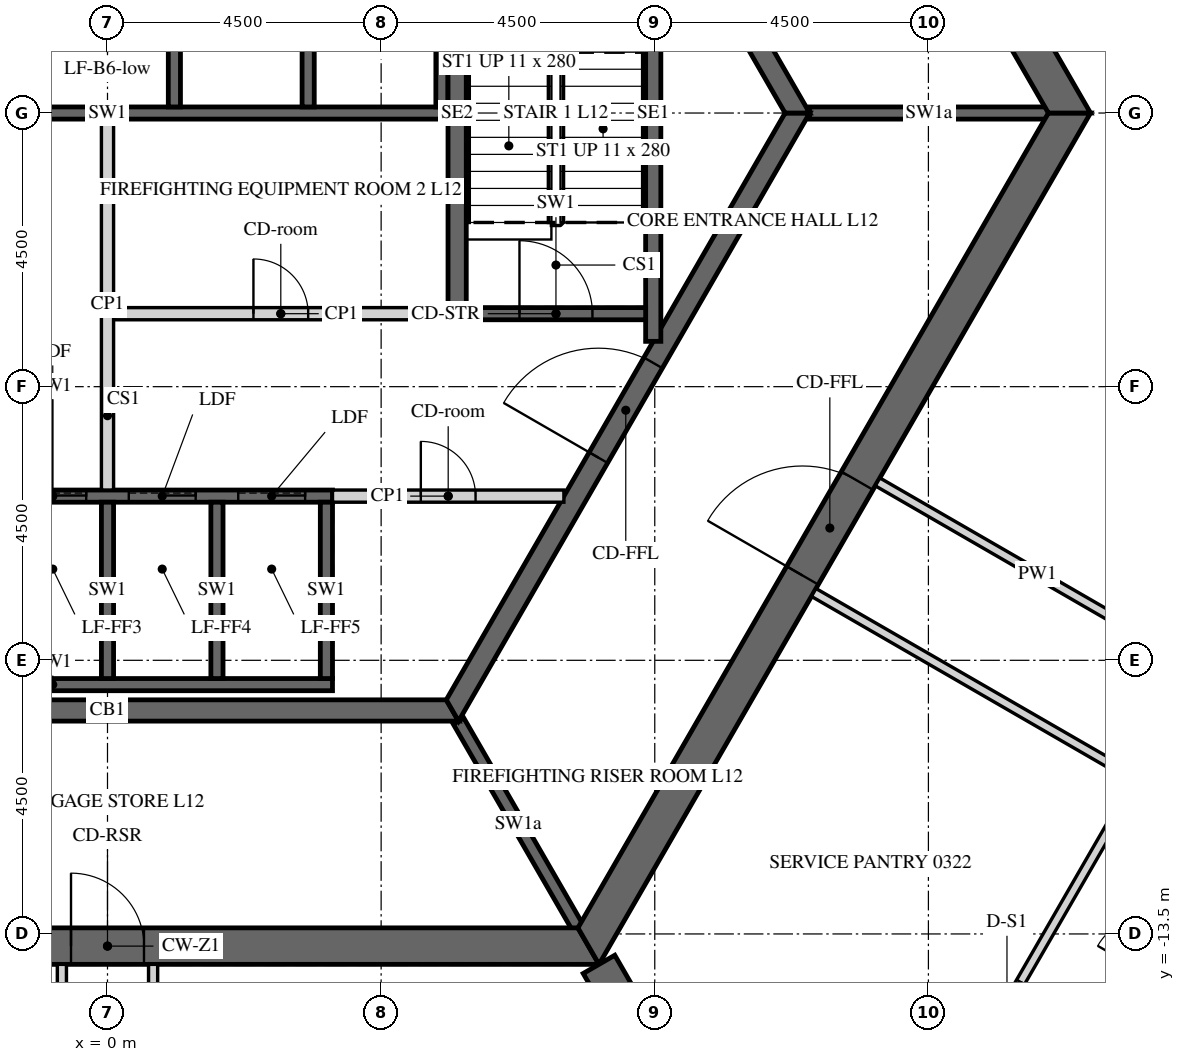
"""IFC4 building model, lengths in metres.
Left out: names, types, materials, properties, quantities, classifications, styles, units other than length and angle.
Written with IfcOpenShell. Run it as: python <this file> out.ifc"""

import sys

from ifc_helpers import new_model, si_unit, direction, frame, frame_2d, origin, place, context, subcontext, project, spatial, polyline, rectangle, outline, extrude, element, fill, save


model = new_model("IFC4")
c1 = context("Model", 3, precision=1e-05, world=origin(), true_north=direction((0.0, 1.0)))
c2 = subcontext(c1, "Body", "Model", "MODEL_VIEW")
j1 = project(units=[si_unit("LENGTHUNIT", "METRE"), si_unit("PLANEANGLEUNIT", "RADIAN")], contexts=[c1])
p1 = place(None, origin())
s1 = spatial("IfcSite", under=j1, at=p1, CompositionType="ELEMENT")
p2 = place(p1, origin())
s2 = spatial("IfcBuilding", under=s1, at=p2, CompositionType="ELEMENT")
p3 = place(p2, frame((0.0, 0.0, 60.9)))
s3 = spatial("IfcBuildingStorey", under=s2, at=p3, CompositionType="ELEMENT", Elevation=60.9)
p4 = place(p3, frame((-7.91, -13.7, -0.15), z_axis=(0.0, 0.0, 1.0), x_axis=(1.0, 0.0, 0.0)))
e1 = element("IfcWall", 1, at=p4, inside=s3, PredefinedType="SHEAR", context=c2, shape_type="SweptSolid", body=[
    extrude(outline(polyline([(-0.173, -0.3), (15.993, -0.3), (15.646, 0.3), (0.173, 0.3), (-0.173, -0.3)])), origin(), (0.0, 0.0, 1.0), 3.9),
])
p5 = place(p4, frame((7.31, 0.0, 0.15)))
e2 = element("IfcOpeningElement", 2, at=p5, cuts=e1, PredefinedType="OPENING", context=c2, shape_type="SweptSolid", body=[
    extrude(rectangle(XDim=1.2, YDim=2.4, at=frame_2d((0.6, 1.2))), frame((0.0, 0.31, 0.0), z_axis=(0.0, -1.0, 0.0), x_axis=(1.0, 0.0, 0.0)), (0.0, 0.0, 1.0), 0.62),
])
p6 = place(p3, frame((7.91, -13.7, -0.15), z_axis=(0.0, 0.0, 1.0), x_axis=(0.499999880136, 0.866025472988, 0.0)))
e3 = element("IfcWall", 3, at=p6, inside=s3, PredefinedType="SHEAR", context=c2, shape_type="SweptSolid", body=[
    extrude(outline(polyline([(-0.173, -0.3), (15.993, -0.3), (15.646, 0.3), (0.173, 0.3), (-0.173, -0.3)])), origin(), (0.0, 0.0, 1.0), 3.9),
])
p7 = place(p6, frame((7.039, 0.0, 0.15)))
e4 = element("IfcOpeningElement", 4, at=p7, cuts=e3, PredefinedType="OPENING", context=c2, shape_type="SweptSolid", body=[
    extrude(rectangle(XDim=1.8, YDim=2.4, at=frame_2d((0.9, 1.2))), frame((0.0, 0.31, 0.0), z_axis=(0.0, -1.0, 0.0), x_axis=(1.0, 0.0, 0.0)), (0.0, 0.0, 1.0), 0.62),
])
p8 = place(p3, frame((15.819, 0.0, -0.15), z_axis=(0.0, 0.0, 1.0), x_axis=(-0.499999880136, 0.866025472988, 0.0)))
e5 = element("IfcWall", 5, at=p8, inside=s3, PredefinedType="SHEAR", context=c2, shape_type="SweptSolid", body=[
    extrude(outline(polyline([(-0.173, -0.3), (15.993, -0.3), (15.646, 0.3), (0.173, 0.3), (-0.173, -0.3)])), origin(), (0.0, 0.0, 1.0), 3.9),
])
p9 = place(p8, frame((6.981, 0.0, 0.15)))
e6 = element("IfcOpeningElement", 6, at=p9, cuts=e5, PredefinedType="OPENING", context=c2, shape_type="SweptSolid", body=[
    extrude(rectangle(XDim=1.8, YDim=2.4, at=frame_2d((0.9, 1.2))), frame((0.0, 0.31, 0.0), z_axis=(0.0, -1.0, 0.0), x_axis=(1.0, 0.0, 0.0)), (0.0, 0.0, 1.0), 0.62),
])
p10 = place(p3, frame((8.083, -14.0, -0.15), z_axis=(0.0, 0.0, 1.0), x_axis=(0.499997680643, -0.866026742862, 0.0)))
e7 = element("IfcWall", 7, at=p10, inside=s3, PredefinedType="SHEAR", context=c2, shape_type="SweptSolid", body=[
    extrude(rectangle(XDim=16.509, YDim=0.6, at=frame_2d((8.254, 0.0))), origin(), (0.0, 0.0, 1.0), 3.9),
])
p11 = place(p10, frame((7.354, 0.0, 0.15)))
e8 = element("IfcOpeningElement", 8, at=p11, cuts=e7, PredefinedType="OPENING", context=c2, shape_type="SweptSolid", body=[
    extrude(rectangle(XDim=1.8, YDim=2.4, at=frame_2d((0.9, 1.2))), frame((0.0, 0.31, 0.0), z_axis=(0.0, -1.0, 0.0), x_axis=(1.0, 0.0, 0.0)), (0.0, 0.0, 1.0), 0.62),
])
p12 = place(p3, frame((-5.673, -9.825, -0.15), z_axis=(0.0, 0.0, 1.0), x_axis=(1.0, 0.0, 0.0)))
e9 = element("IfcWall", 9, at=p12, inside=s3, PredefinedType="SHEAR", context=c2, shape_type="SweptSolid", body=[
    extrude(outline(polyline([(-0.101, -0.175), (11.446, -0.175), (11.244, 0.175), (0.101, 0.175), (-0.101, -0.175)])), origin(), (0.0, 0.0, 1.0), 3.9),
])
p13 = place(p3, frame((5.673, -9.825, -0.15), z_axis=(0.0, 0.0, 1.0), x_axis=(0.499995046907, 0.866028263435, 0.0)))
e10 = element("IfcWall", 10, at=p13, inside=s3, PredefinedType="SHEAR", context=c2, shape_type="SweptSolid", body=[
    extrude(outline(polyline([(-0.101, -0.175), (11.446, -0.175), (11.244, 0.175), (0.101, 0.175), (-0.101, -0.175)])), origin(), (0.0, 0.0, 1.0), 3.9),
])
p14 = place(p13, frame((4.801, 0.0, 0.15)))
e11 = element("IfcOpeningElement", 11, at=p14, cuts=e10, PredefinedType="OPENING", context=c2, shape_type="SweptSolid", body=[
    extrude(rectangle(XDim=1.8, YDim=2.4, at=frame_2d((0.9, 1.2))), frame((0.0, 0.185, 0.0), z_axis=(0.0, -1.0, 0.0), x_axis=(1.0, 0.0, 0.0)), (0.0, 0.0, 1.0), 0.37),
])
p15 = place(p3, frame((11.345, 0.0, -0.15), z_axis=(0.0, 0.0, 1.0), x_axis=(-0.499995046907, 0.866028263435, 0.0)))
e12 = element("IfcWall", 12, at=p15, inside=s3, PredefinedType="SHEAR", context=c2, shape_type="SweptSolid", body=[
    extrude(outline(polyline([(-0.101, -0.175), (11.446, -0.175), (11.244, 0.175), (0.101, 0.175), (-0.101, -0.175)])), origin(), (0.0, 0.0, 1.0), 3.9),
])
p16 = place(p15, frame((4.744, 0.0, 0.15)))
e13 = element("IfcOpeningElement", 13, at=p16, cuts=e12, PredefinedType="OPENING", context=c2, shape_type="SweptSolid", body=[
    extrude(rectangle(XDim=1.8, YDim=2.4, at=frame_2d((0.9, 1.2))), frame((0.0, 0.185, 0.0), z_axis=(0.0, -1.0, 0.0), x_axis=(1.0, 0.0, 0.0)), (0.0, 0.0, 1.0), 0.37),
])
p17 = place(p3, frame((-5.6, 0.0, -0.25), z_axis=(0.0, 0.0, 1.0), x_axis=(1.0, 0.0, 0.0)))
e14 = element("IfcWall", 14, at=p17, inside=s3, PredefinedType="SHEAR", context=c2, shape_type="SweptSolid", body=[
    extrude(rectangle(XDim=11.2, YDim=0.2, at=frame_2d((5.6, 0.0))), origin(), (0.0, 0.0, 1.0), 3.9),
])
for number, where, z_axis, x_axis in (
    (15, (1.1, 0.1, -0.25), (0.0, 0.0, 1.0), (0.0, 1.0, 0.0)),
    (16, (3.3, 0.1, -0.25), (0.0, 0.0, 1.0), (0.0, 1.0, 0.0)),
    (17, (5.5, 0.1, -0.25), (0.0, 0.0, 1.0), (0.0, 1.0, 0.0)),
):
    element("IfcWall", number, at=place(p3, frame(where, z_axis=z_axis, x_axis=x_axis)), inside=s3, PredefinedType="SHEAR", context=c2, shape_type="SweptSolid", body=[
        extrude(rectangle(XDim=3.1, YDim=0.2, at=frame_2d((1.55, 0.0))), origin(), (0.0, 0.0, 1.0), 3.9),
    ])
p18 = place(p3, frame((-5.5, -6.3, -0.25), z_axis=(0.0, 0.0, 1.0), x_axis=(1.0, 0.0, 0.0)))
e18 = element("IfcWall", 18, at=p18, inside=s3, PredefinedType="SHEAR", context=c2, shape_type="SweptSolid", body=[
    extrude(rectangle(XDim=9.2, YDim=0.2, at=frame_2d((4.6, 0.0))), origin(), (0.0, 0.0, 1.0), 3.9),
])
p19 = place(p18, frame((0.45, 0.0, 0.25)))
e19 = element("IfcOpeningElement", 19, at=p19, cuts=e18, PredefinedType="OPENING", context=c2, shape_type="SweptSolid", body=[
    extrude(rectangle(XDim=1.1, YDim=2.1, at=frame_2d((0.55, 1.05))), frame((0.0, 0.11, 0.0), z_axis=(0.0, -1.0, 0.0), x_axis=(1.0, 0.0, 0.0)), (0.0, 0.0, 1.0), 0.22),
])
p20 = place(p18, frame((2.25, 0.0, 0.25)))
e20 = element("IfcOpeningElement", 20, at=p20, cuts=e18, PredefinedType="OPENING", context=c2, shape_type="SweptSolid", body=[
    extrude(rectangle(XDim=1.1, YDim=2.1, at=frame_2d((0.55, 1.05))), frame((0.0, 0.11, 0.0), z_axis=(0.0, -1.0, 0.0), x_axis=(1.0, 0.0, 0.0)), (0.0, 0.0, 1.0), 0.22),
])
p21 = place(p18, frame((4.05, 0.0, 0.25)))
e21 = element("IfcOpeningElement", 21, at=p21, cuts=e18, PredefinedType="OPENING", context=c2, shape_type="SweptSolid", body=[
    extrude(rectangle(XDim=1.1, YDim=2.1, at=frame_2d((0.55, 1.05))), frame((0.0, 0.11, 0.0), z_axis=(0.0, -1.0, 0.0), x_axis=(1.0, 0.0, 0.0)), (0.0, 0.0, 1.0), 0.22),
])
p22 = place(p18, frame((5.85, 0.0, 0.25)))
e22 = element("IfcOpeningElement", 22, at=p22, cuts=e18, PredefinedType="OPENING", context=c2, shape_type="SweptSolid", body=[
    extrude(rectangle(XDim=1.1, YDim=2.1, at=frame_2d((0.55, 1.05))), frame((0.0, 0.11, 0.0), z_axis=(0.0, -1.0, 0.0), x_axis=(1.0, 0.0, 0.0)), (0.0, 0.0, 1.0), 0.22),
])
p23 = place(p18, frame((7.65, 0.0, 0.25)))
e23 = element("IfcOpeningElement", 23, at=p23, cuts=e18, PredefinedType="OPENING", context=c2, shape_type="SweptSolid", body=[
    extrude(rectangle(XDim=1.1, YDim=2.1, at=frame_2d((0.55, 1.05))), frame((0.0, 0.11, 0.0), z_axis=(0.0, -1.0, 0.0), x_axis=(1.0, 0.0, 0.0)), (0.0, 0.0, 1.0), 0.22),
])
p24 = place(p3, frame((-5.5, -9.4, -0.25), z_axis=(0.0, 0.0, 1.0), x_axis=(1.0, 0.0, 0.0)))
e24 = element("IfcWall", 24, at=p24, inside=s3, PredefinedType="SHEAR", context=c2, shape_type="SweptSolid", body=[
    extrude(rectangle(XDim=9.2, YDim=0.2, at=frame_2d((4.6, 0.0))), origin(), (0.0, 0.0, 1.0), 3.9),
])
for number, where, z_axis, x_axis in (
    (25, (0.0, -9.3, -0.25), (0.0, 0.0, 1.0), (0.0, 1.0, 0.0)),
    (26, (1.8, -9.3, -0.25), (0.0, 0.0, 1.0), (0.0, 1.0, 0.0)),
    (27, (3.6, -9.3, -0.25), (0.0, 0.0, 1.0), (0.0, 1.0, 0.0)),
):
    element("IfcWall", number, at=place(p3, frame(where, z_axis=z_axis, x_axis=x_axis)), inside=s3, PredefinedType="SHEAR", context=c2, shape_type="SweptSolid", body=[
        extrude(rectangle(XDim=2.9, YDim=0.2, at=frame_2d((1.45, 0.0))), origin(), (0.0, 0.0, 1.0), 3.9),
    ])
p25 = place(p3, frame((0.1, -3.3, 0.0), z_axis=(0.0, 0.0, 1.0), x_axis=(1.0, 0.0, 0.0)))
e28 = element("IfcWall", 28, at=p25, inside=s3, PredefinedType="PARTITIONING", context=c2, shape_type="SweptSolid", body=[
    extrude(rectangle(XDim=5.5, YDim=0.2, at=frame_2d((2.75, 0.0))), origin(), (0.0, 0.0, 1.0), 3.65),
])
p26 = place(p25, frame((2.3, 0.0, 0.0)))
e29 = element("IfcOpeningElement", 29, at=p26, cuts=e28, PredefinedType="OPENING", context=c2, shape_type="SweptSolid", body=[
    extrude(rectangle(XDim=0.9, YDim=2.1, at=frame_2d((0.45, 1.05))), frame((0.0, 0.11, 0.0), z_axis=(0.0, -1.0, 0.0), x_axis=(1.0, 0.0, 0.0)), (0.0, 0.0, 1.0), 0.22),
])
p27 = place(p3, frame((0.0, -6.2, 0.0), z_axis=(0.0, 0.0, 1.0), x_axis=(0.0, 1.0, 0.0)))
e30 = element("IfcWall", 30, at=p27, inside=s3, PredefinedType="PARTITIONING", context=c2, shape_type="SweptSolid", body=[
    extrude(rectangle(XDim=6.1, YDim=0.2, at=frame_2d((3.05, 0.0))), origin(), (0.0, 0.0, 1.0), 3.65),
])
p28 = place(p3, frame((3.7, -6.3, 0.0), z_axis=(0.0, 0.0, 1.0), x_axis=(1.0, 0.0, 0.0)))
e31 = element("IfcWall", 31, at=p28, inside=s3, PredefinedType="PARTITIONING", context=c2, shape_type="SweptSolid", body=[
    extrude(rectangle(XDim=3.806, YDim=0.2, at=frame_2d((1.903, 0.0))), origin(), (0.0, 0.0, 1.0), 3.65),
])
p29 = place(p28, frame((1.453, 0.0, 0.0)))
e32 = element("IfcOpeningElement", 32, at=p29, cuts=e31, PredefinedType="OPENING", context=c2, shape_type="SweptSolid", body=[
    extrude(rectangle(XDim=0.9, YDim=2.1, at=frame_2d((0.45, 1.05))), frame((0.0, 0.11, 0.0), z_axis=(0.0, -1.0, 0.0), x_axis=(1.0, 0.0, 0.0)), (0.0, 0.0, 1.0), 0.22),
])
p30 = place(p3, frame((11.547, 0.0, -0.15), z_axis=(0.0, 0.0, 1.0), x_axis=(1.0, 0.0, 0.0)))
e33 = element("IfcWall", 33, at=p30, inside=s3, PredefinedType="SHEAR", context=c2, shape_type="SweptSolid", body=[
    extrude(rectangle(XDim=3.926, YDim=0.2, at=frame_2d((1.963, 0.0))), origin(), (0.0, 0.0, 1.0), 3.9),
])
p31 = place(p3, frame((5.773, -10.0, -0.15), z_axis=(0.0, 0.0, 1.0), x_axis=(0.500038251005, -0.86600331843, 0.0)))
e34 = element("IfcWall", 34, at=p31, inside=s3, PredefinedType="SHEAR", context=c2, shape_type="SweptSolid", body=[
    extrude(rectangle(XDim=3.926, YDim=0.2, at=frame_2d((1.963, 0.0))), origin(), (0.0, 0.0, 1.0), 3.9),
])
p32 = place(p3, frame((5.75, -3.4, -0.25), z_axis=(0.0, 0.0, 1.0), x_axis=(0.0, 1.0, 0.0)))
e35 = element("IfcWall", 35, at=p32, inside=s3, PredefinedType="SHEAR", context=c2, shape_type="SweptSolid", body=[
    extrude(rectangle(XDim=6.8, YDim=0.3, at=frame_2d((3.4, 0.0))), origin(), (0.0, 0.0, 1.0), 3.9),
])
p33 = place(p3, frame((8.975, -3.755, -0.25), z_axis=(0.0, 0.0, 1.0), x_axis=(0.0, 1.0, 0.0)))
e36 = element("IfcWall", 36, at=p33, inside=s3, PredefinedType="SHEAR", context=c2, shape_type="SweptSolid", body=[
    extrude(rectangle(XDim=7.51, YDim=0.25, at=frame_2d((3.755, 0.0))), origin(), (0.0, 0.0, 1.0), 3.9),
])
p34 = place(p3, frame((5.9, -3.3, -0.25), z_axis=(0.0, 0.0, 1.0), x_axis=(1.0, 0.0, 0.0)))
e37 = element("IfcWall", 37, at=p34, inside=s3, PredefinedType="SHEAR", context=c2, shape_type="SweptSolid", body=[
    extrude(rectangle(XDim=2.95, YDim=0.2, at=frame_2d((1.475, 0.0))), origin(), (0.0, 0.0, 1.0), 3.9),
])
p35 = place(p34, frame((0.875, 0.0, 0.25)))
e38 = element("IfcOpeningElement", 38, at=p35, cuts=e37, PredefinedType="OPENING", context=c2, shape_type="SweptSolid", body=[
    extrude(rectangle(XDim=1.2, YDim=2.4, at=frame_2d((0.6, 1.2))), frame((0.0, 0.11, 0.0), z_axis=(0.0, -1.0, 0.0), x_axis=(1.0, 0.0, 0.0)), (0.0, 0.0, 1.0), 0.22),
])
p36 = place(p3, frame((-0.75, -14.0, 0.0), z_axis=(0.0, 0.0, 1.0), x_axis=(0.0, -1.0, 0.0)))
e39 = element("IfcWall", 39, at=p36, inside=s3, PredefinedType="PARTITIONING", context=c2, shape_type="SweptSolid", body=[
    extrude(rectangle(XDim=6.252, YDim=0.15, at=frame_2d((3.126, 0.0))), origin(), (0.0, 0.0, 1.0), 2.988),
])
p37 = place(p3, frame((0.75, -20.072, 0.0), z_axis=(0.0, 0.0, 1.0), x_axis=(0.0, 1.0, 0.0)))
e40 = element("IfcWall", 40, at=p37, inside=s3, PredefinedType="PARTITIONING", context=c2, shape_type="SweptSolid", body=[
    extrude(rectangle(XDim=6.072, YDim=0.15, at=frame_2d((3.036, 0.0))), origin(), (0.0, 0.0, 1.0), 2.988),
])
p38 = place(p3, frame((13.928, -19.775, 0.0), z_axis=(0.0, 0.0, 1.0), x_axis=(0.50000450071, 0.866022805283, 0.0)))
e41 = element("IfcWall", 41, at=p38, inside=s3, PredefinedType="PARTITIONING", context=c2, shape_type="SweptSolid", body=[
    extrude(rectangle(XDim=23.877, YDim=0.15, at=frame_2d((11.938, 0.0))), origin(), (0.0, 0.0, 1.0), 2.988),
])
p39 = place(p38, frame((6.443, 0.0, 0.0)))
e42 = element("IfcOpeningElement", 42, at=p39, cuts=e41, PredefinedType="OPENING", context=c2, shape_type="SweptSolid", body=[
    extrude(rectangle(XDim=1.0, YDim=2.1, at=frame_2d((0.5, 1.05))), frame((0.0, 0.085, 0.0), z_axis=(0.0, -1.0, 0.0), x_axis=(1.0, 0.0, 0.0)), (0.0, 0.0, 1.0), 0.17),
])
p40 = place(p38, frame((14.972, 0.0, 0.0)))
e43 = element("IfcOpeningElement", 43, at=p40, cuts=e41, PredefinedType="OPENING", context=c2, shape_type="SweptSolid", body=[
    extrude(rectangle(XDim=1.0, YDim=2.1, at=frame_2d((0.5, 1.05))), frame((0.0, 0.085, 0.0), z_axis=(0.0, -1.0, 0.0), x_axis=(1.0, 0.0, 0.0)), (0.0, 0.0, 1.0), 0.17),
])
p41 = place(p3, frame((25.821, 0.972, 0.0), z_axis=(0.0, 0.0, 1.0), x_axis=(-0.559201442833, 0.829031812619, 0.0)))
e44 = element("IfcWall", 44, at=p41, inside=s3, PredefinedType="PARTITIONING", context=c2, shape_type="SweptSolid", body=[
    extrude(rectangle(XDim=22.002, YDim=0.15, at=frame_2d((11.001, 0.0))), origin(), (0.0, 0.0, 1.0), 2.988),
])
p42 = place(p41, frame((0.769, 0.0, 0.0)))
e45 = element("IfcOpeningElement", 45, at=p42, cuts=e44, PredefinedType="OPENING", context=c2, shape_type="SweptSolid", body=[
    extrude(rectangle(XDim=1.0, YDim=2.1, at=frame_2d((0.5, 1.05))), frame((0.0, 0.085, 0.0), z_axis=(0.0, -1.0, 0.0), x_axis=(1.0, 0.0, 0.0)), (0.0, 0.0, 1.0), 0.17),
])
p43 = place(p41, frame((11.421, 0.0, 0.0)))
e46 = element("IfcOpeningElement", 46, at=p43, cuts=e44, PredefinedType="OPENING", context=c2, shape_type="SweptSolid", body=[
    extrude(rectangle(XDim=1.0, YDim=2.1, at=frame_2d((0.5, 1.05))), frame((0.0, 0.085, 0.0), z_axis=(0.0, -1.0, 0.0), x_axis=(1.0, 0.0, 0.0)), (0.0, 0.0, 1.0), 0.17),
])
p44 = place(p41, frame((19.711, 0.0, 0.0)))
e47 = element("IfcOpeningElement", 47, at=p44, cuts=e44, PredefinedType="OPENING", context=c2, shape_type="SweptSolid", body=[
    extrude(rectangle(XDim=1.0, YDim=2.1, at=frame_2d((0.5, 1.05))), frame((0.0, 0.085, 0.0), z_axis=(0.0, -1.0, 0.0), x_axis=(1.0, 0.0, 0.0)), (0.0, 0.0, 1.0), 0.17),
])
p45 = place(p3, frame((17.925, -9.103, 0.0), z_axis=(0.0, 0.0, 1.0), x_axis=(-0.866013586754, 0.500020467139, 0.0)))
e48 = element("IfcWall", 48, at=p45, inside=s3, PredefinedType="PARTITIONING", context=c2, shape_type="SweptSolid", body=[
    extrude(rectangle(XDim=6.075, YDim=0.15, at=frame_2d((3.038, 0.0))), origin(), (0.0, 0.0, 1.0), 2.988),
])
p46 = place(p3, frame((11.614, -7.884, 0.0), z_axis=(0.0, 0.0, 1.0), x_axis=(0.866033542371, -0.499985903289, 0.0)))
e49 = element("IfcWall", 49, at=p46, inside=s3, PredefinedType="PARTITIONING", context=c2, shape_type="SweptSolid", body=[
    extrude(rectangle(XDim=6.15, YDim=0.15, at=frame_2d((3.075, 0.0))), origin(), (0.0, 0.0, 1.0), 2.988),
])
p47 = place(p3, frame((16.902, -11.024, 0.0), z_axis=(0.0, 0.0, 1.0), x_axis=(-0.499999527968, -0.866025676312, 0.0)))
e50 = element("IfcWall", 50, at=p47, inside=s3, PredefinedType="PARTITIONING", context=c2, shape_type="SweptSolid", body=[
    extrude(rectangle(XDim=8.441, YDim=0.15, at=frame_2d((4.22, 0.0))), origin(), (0.0, 0.0, 1.0), 2.988),
])
p48 = place(p47, frame((3.771, 0.0, 0.0)))
e51 = element("IfcOpeningElement", 51, at=p48, cuts=e50, PredefinedType="OPENING", context=c2, shape_type="SweptSolid", body=[
    extrude(rectangle(XDim=0.9, YDim=2.1, at=frame_2d((0.45, 1.05))), frame((0.0, 0.085, 0.0), z_axis=(0.0, -1.0, 0.0), x_axis=(1.0, 0.0, 0.0)), (0.0, 0.0, 1.0), 0.17),
])
p49 = place(p7, origin())
e52 = element("IfcDoor", 52, at=p49, inside=s3, OperationType="DOUBLE_DOOR_SINGLE_SWING", PredefinedType="DOOR", context=c2, shape_type="SweptSolid", body=[
    extrude(rectangle(XDim=1.8, YDim=2.4, at=frame_2d((0.9, 1.2))), frame((0.0, 0.025, 0.0), z_axis=(0.0, -1.0, 0.0), x_axis=(1.0, 0.0, 0.0)), (0.0, 0.0, 1.0), 0.05),
])
fill(e4, e52)
p50 = place(p5, origin())
e53 = element("IfcDoor", 53, at=p50, inside=s3, OperationType="SINGLE_SWING_LEFT", PredefinedType="DOOR", context=c2, shape_type="SweptSolid", body=[
    extrude(rectangle(XDim=1.2, YDim=2.4, at=frame_2d((0.6, 1.2))), frame((0.0, 0.025, 0.0), z_axis=(0.0, -1.0, 0.0), x_axis=(1.0, 0.0, 0.0)), (0.0, 0.0, 1.0), 0.05),
])
fill(e2, e53)
p51 = place(p14, origin())
e54 = element("IfcDoor", 54, at=p51, inside=s3, OperationType="DOUBLE_DOOR_SINGLE_SWING", PredefinedType="DOOR", context=c2, shape_type="SweptSolid", body=[
    extrude(rectangle(XDim=1.8, YDim=2.4, at=frame_2d((0.9, 1.2))), frame((0.0, 0.025, 0.0), z_axis=(0.0, -1.0, 0.0), x_axis=(1.0, 0.0, 0.0)), (0.0, 0.0, 1.0), 0.05),
])
fill(e11, e54)
p52 = place(p26, origin())
e55 = element("IfcDoor", 55, at=p52, inside=s3, OperationType="SINGLE_SWING_LEFT", PredefinedType="DOOR", context=c2, shape_type="SweptSolid", body=[
    extrude(rectangle(XDim=0.9, YDim=2.1, at=frame_2d((0.45, 1.05))), frame((0.0, 0.025, 0.0), z_axis=(0.0, -1.0, 0.0), x_axis=(1.0, 0.0, 0.0)), (0.0, 0.0, 1.0), 0.05),
])
fill(e29, e55)
p53 = place(p29, origin())
e56 = element("IfcDoor", 56, at=p53, inside=s3, OperationType="SINGLE_SWING_LEFT", PredefinedType="DOOR", context=c2, shape_type="SweptSolid", body=[
    extrude(rectangle(XDim=0.9, YDim=2.1, at=frame_2d((0.45, 1.05))), frame((0.0, 0.025, 0.0), z_axis=(0.0, -1.0, 0.0), x_axis=(1.0, 0.0, 0.0)), (0.0, 0.0, 1.0), 0.05),
])
fill(e32, e56)
p54 = place(p35, origin())
e57 = element("IfcDoor", 57, at=p54, inside=s3, OperationType="SINGLE_SWING_LEFT", PredefinedType="DOOR", context=c2, shape_type="SweptSolid", body=[
    extrude(rectangle(XDim=1.2, YDim=2.4, at=frame_2d((0.6, 1.2))), frame((0.0, 0.025, 0.0), z_axis=(0.0, -1.0, 0.0), x_axis=(1.0, 0.0, 0.0)), (0.0, 0.0, 1.0), 0.05),
])
fill(e38, e57)
p55 = place(p21, origin())
e58 = element("IfcDoor", 58, at=p55, inside=s3, OperationType="SLIDING_TO_LEFT", PredefinedType="DOOR", context=c2, shape_type="SweptSolid", body=[
    extrude(rectangle(XDim=1.1, YDim=2.1, at=frame_2d((0.55, 1.05))), frame((0.0, 0.025, 0.0), z_axis=(0.0, -1.0, 0.0), x_axis=(1.0, 0.0, 0.0)), (0.0, 0.0, 1.0), 0.05),
])
fill(e21, e58)
p56 = place(p22, origin())
e59 = element("IfcDoor", 59, at=p56, inside=s3, OperationType="SLIDING_TO_LEFT", PredefinedType="DOOR", context=c2, shape_type="SweptSolid", body=[
    extrude(rectangle(XDim=1.1, YDim=2.1, at=frame_2d((0.55, 1.05))), frame((0.0, 0.025, 0.0), z_axis=(0.0, -1.0, 0.0), x_axis=(1.0, 0.0, 0.0)), (0.0, 0.0, 1.0), 0.05),
])
fill(e22, e59)
p57 = place(p23, origin())
e60 = element("IfcDoor", 60, at=p57, inside=s3, OperationType="SLIDING_TO_LEFT", PredefinedType="DOOR", context=c2, shape_type="SweptSolid", body=[
    extrude(rectangle(XDim=1.1, YDim=2.1, at=frame_2d((0.55, 1.05))), frame((0.0, 0.025, 0.0), z_axis=(0.0, -1.0, 0.0), x_axis=(1.0, 0.0, 0.0)), (0.0, 0.0, 1.0), 0.05),
])
fill(e23, e60)
p58 = place(p48, origin())
e61 = element("IfcDoor", 61, at=p58, inside=s3, OperationType="SINGLE_SWING_RIGHT", PredefinedType="DOOR", context=c2, shape_type="SweptSolid", body=[
    extrude(rectangle(XDim=0.9, YDim=2.1, at=frame_2d((0.45, 1.05))), frame((0.0, 0.025, 0.0), z_axis=(0.0, -1.0, 0.0), x_axis=(1.0, 0.0, 0.0)), (0.0, 0.0, 1.0), 0.05),
])
fill(e51, e61)
save(model, sys.argv[1])
